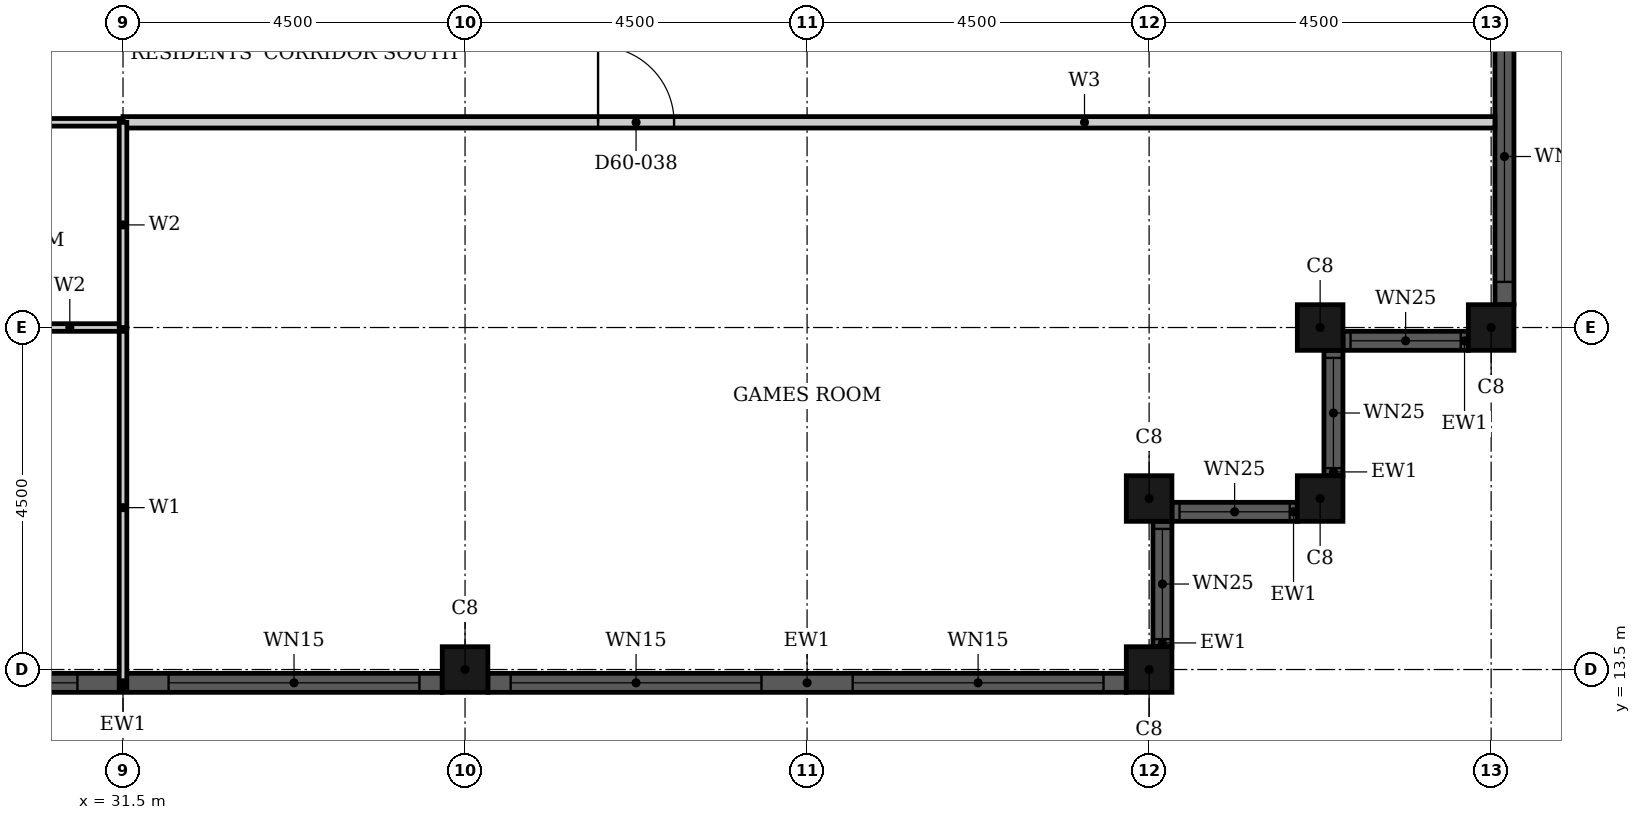
"""IFC4 building model, lengths in metres.
Left out: names, types, materials, properties, quantities, classifications, styles, units other than length and angle.
Written with IfcOpenShell. Run it as: python <this file> out.ifc"""

import sys

from ifc_helpers import new_model, si_unit, direction, frame, frame_2d, origin, origin_2d, place, context, subcontext, project, spatial, rectangle, hollow_rectangle, extrude, element, fill, save


model = new_model("IFC4")
c1 = context("Model", 3, precision=1e-05, world=origin(), true_north=direction((0.0, 1.0)))
c2 = subcontext(c1, "Body", "Model", "MODEL_VIEW")
j1 = project(units=[si_unit("LENGTHUNIT", "METRE"), si_unit("PLANEANGLEUNIT", "RADIAN")], contexts=[c1])
p1 = place(None, origin())
s1 = spatial("IfcSite", under=j1, at=p1, CompositionType="ELEMENT")
p2 = place(p1, origin())
s2 = spatial("IfcBuilding", under=s1, at=p2, CompositionType="ELEMENT")
p3 = place(p2, frame((0.0, 0.0, 237.9)))
s3 = spatial("IfcBuildingStorey", under=s2, at=p3, CompositionType="ELEMENT", Elevation=237.9)
for number, where, z_axis, x_axis in (
    (1, (36.0, 13.5, 0.0), (0.0, 0.0, 1.0), (1.0, 0.0, 0.0)),
    (2, (45.0, 13.5, 0.0), (0.0, 0.0, 1.0), (1.0, 0.0, 0.0)),
    (3, (45.0, 15.75, 0.0), (0.0, 0.0, 1.0), (1.0, 0.0, 0.0)),
    (4, (47.25, 15.75, 0.0), (0.0, 0.0, 1.0), (1.0, 0.0, 0.0)),
    (5, (47.25, 18.0, 0.0), (0.0, 0.0, 1.0), (1.0, 0.0, 0.0)),
    (6, (49.5, 18.0, 0.0), (0.0, 0.0, 1.0), (1.0, 0.0, 0.0)),
):
    element("IfcColumn", number, at=place(p3, frame(where, z_axis=z_axis, x_axis=x_axis)), inside=s3, PredefinedType="COLUMN", context=c2, shape_type="SweptSolid", body=[
        extrude(hollow_rectangle(XDim=0.6, YDim=0.6, WallThickness=0.02, at=origin_2d()), origin(), (0.0, 0.0, 1.0), 3.7),
    ])
p4 = place(p3, frame((27.3, 13.325, 0.0), z_axis=(0.0, 0.0, 1.0), x_axis=(1.0, 0.0, 0.0)))
e7 = element("IfcWall", 7, at=p4, inside=s3, PredefinedType="SOLIDWALL", context=c2, shape_type="SweptSolid", body=[
    extrude(rectangle(XDim=8.4, YDim=0.25, at=frame_2d((4.2, 0.0))), origin(), (0.0, 0.0, 1.0), 3.7),
])
p5 = place(p4, frame((0.3, 0.0, 0.45)))
e8 = element("IfcOpeningElement", 8, at=p5, cuts=e7, PredefinedType="OPENING", context=c2, shape_type="SweptSolid", body=[
    extrude(rectangle(XDim=3.3, YDim=2.3, at=frame_2d((1.65, 1.15))), frame((0.0, 0.135, 0.0), z_axis=(0.0, -1.0, 0.0), x_axis=(1.0, 0.0, 0.0)), (0.0, 0.0, 1.0), 0.27),
])
p6 = place(p4, frame((4.8, 0.0, 0.45)))
e9 = element("IfcOpeningElement", 9, at=p6, cuts=e7, PredefinedType="OPENING", context=c2, shape_type="SweptSolid", body=[
    extrude(rectangle(XDim=3.3, YDim=2.3, at=frame_2d((1.65, 1.15))), frame((0.0, 0.135, 0.0), z_axis=(0.0, -1.0, 0.0), x_axis=(1.0, 0.0, 0.0)), (0.0, 0.0, 1.0), 0.27),
])
p7 = place(p3, frame((36.3, 13.325, 0.0), z_axis=(0.0, 0.0, 1.0), x_axis=(1.0, 0.0, 0.0)))
e10 = element("IfcWall", 10, at=p7, inside=s3, PredefinedType="SOLIDWALL", context=c2, shape_type="SweptSolid", body=[
    extrude(rectangle(XDim=8.4, YDim=0.25, at=frame_2d((4.2, 0.0))), origin(), (0.0, 0.0, 1.0), 3.7),
])
p8 = place(p7, frame((0.3, 0.0, 0.45)))
e11 = element("IfcOpeningElement", 11, at=p8, cuts=e10, PredefinedType="OPENING", context=c2, shape_type="SweptSolid", body=[
    extrude(rectangle(XDim=3.3, YDim=2.3, at=frame_2d((1.65, 1.15))), frame((0.0, 0.135, 0.0), z_axis=(0.0, -1.0, 0.0), x_axis=(1.0, 0.0, 0.0)), (0.0, 0.0, 1.0), 0.27),
])
p9 = place(p7, frame((4.8, 0.0, 0.45)))
e12 = element("IfcOpeningElement", 12, at=p9, cuts=e10, PredefinedType="OPENING", context=c2, shape_type="SweptSolid", body=[
    extrude(rectangle(XDim=3.3, YDim=2.3, at=frame_2d((1.65, 1.15))), frame((0.0, 0.135, 0.0), z_axis=(0.0, -1.0, 0.0), x_axis=(1.0, 0.0, 0.0)), (0.0, 0.0, 1.0), 0.27),
])
p10 = place(p3, frame((45.175, 13.8, 0.0), z_axis=(0.0, 0.0, 1.0), x_axis=(0.0, 1.0, 0.0)))
e13 = element("IfcWall", 13, at=p10, inside=s3, PredefinedType="SOLIDWALL", context=c2, shape_type="SweptSolid", body=[
    extrude(rectangle(XDim=1.65, YDim=0.25, at=frame_2d((0.825, 0.0))), origin(), (0.0, 0.0, 1.0), 3.7),
])
p11 = place(p10, frame((0.1, 0.0, 0.9)))
e14 = element("IfcOpeningElement", 14, at=p11, cuts=e13, PredefinedType="OPENING", context=c2, shape_type="SweptSolid", body=[
    extrude(rectangle(XDim=1.45, YDim=1.85, at=frame_2d((0.725, 0.925))), frame((0.0, 0.135, 0.0), z_axis=(0.0, -1.0, 0.0), x_axis=(1.0, 0.0, 0.0)), (0.0, 0.0, 1.0), 0.27),
])
p12 = place(p3, frame((45.3, 15.575, 0.0), z_axis=(0.0, 0.0, 1.0), x_axis=(1.0, 0.0, 0.0)))
e15 = element("IfcWall", 15, at=p12, inside=s3, PredefinedType="SOLIDWALL", context=c2, shape_type="SweptSolid", body=[
    extrude(rectangle(XDim=1.65, YDim=0.25, at=frame_2d((0.825, 0.0))), origin(), (0.0, 0.0, 1.0), 3.7),
])
p13 = place(p12, frame((0.1, 0.0, 0.9)))
e16 = element("IfcOpeningElement", 16, at=p13, cuts=e15, PredefinedType="OPENING", context=c2, shape_type="SweptSolid", body=[
    extrude(rectangle(XDim=1.45, YDim=1.85, at=frame_2d((0.725, 0.925))), frame((0.0, 0.135, 0.0), z_axis=(0.0, -1.0, 0.0), x_axis=(1.0, 0.0, 0.0)), (0.0, 0.0, 1.0), 0.27),
])
p14 = place(p3, frame((47.425, 16.05, 0.0), z_axis=(0.0, 0.0, 1.0), x_axis=(0.0, 1.0, 0.0)))
e17 = element("IfcWall", 17, at=p14, inside=s3, PredefinedType="SOLIDWALL", context=c2, shape_type="SweptSolid", body=[
    extrude(rectangle(XDim=1.65, YDim=0.25, at=frame_2d((0.825, 0.0))), origin(), (0.0, 0.0, 1.0), 3.7),
])
p15 = place(p14, frame((0.1, 0.0, 0.9)))
e18 = element("IfcOpeningElement", 18, at=p15, cuts=e17, PredefinedType="OPENING", context=c2, shape_type="SweptSolid", body=[
    extrude(rectangle(XDim=1.45, YDim=1.85, at=frame_2d((0.725, 0.925))), frame((0.0, 0.135, 0.0), z_axis=(0.0, -1.0, 0.0), x_axis=(1.0, 0.0, 0.0)), (0.0, 0.0, 1.0), 0.27),
])
p16 = place(p3, frame((47.55, 17.825, 0.0), z_axis=(0.0, 0.0, 1.0), x_axis=(1.0, 0.0, 0.0)))
e19 = element("IfcWall", 19, at=p16, inside=s3, PredefinedType="SOLIDWALL", context=c2, shape_type="SweptSolid", body=[
    extrude(rectangle(XDim=1.65, YDim=0.25, at=frame_2d((0.825, 0.0))), origin(), (0.0, 0.0, 1.0), 3.7),
])
p17 = place(p16, frame((0.1, 0.0, 0.9)))
e20 = element("IfcOpeningElement", 20, at=p17, cuts=e19, PredefinedType="OPENING", context=c2, shape_type="SweptSolid", body=[
    extrude(rectangle(XDim=1.45, YDim=1.85, at=frame_2d((0.725, 0.925))), frame((0.0, 0.135, 0.0), z_axis=(0.0, -1.0, 0.0), x_axis=(1.0, 0.0, 0.0)), (0.0, 0.0, 1.0), 0.27),
])
p18 = place(p3, frame((49.675, 18.3, 0.0), z_axis=(0.0, 0.0, 1.0), x_axis=(0.0, 1.0, 0.0)))
e21 = element("IfcWall", 21, at=p18, inside=s3, PredefinedType="SOLIDWALL", context=c2, shape_type="SweptSolid", body=[
    extrude(rectangle(XDim=8.4, YDim=0.25, at=frame_2d((4.2, 0.0))), origin(), (0.0, 0.0, 1.0), 3.7),
])
p19 = place(p18, frame((0.3, 0.0, 0.45)))
e22 = element("IfcOpeningElement", 22, at=p19, cuts=e21, PredefinedType="OPENING", context=c2, shape_type="SweptSolid", body=[
    extrude(rectangle(XDim=3.3, YDim=2.3, at=frame_2d((1.65, 1.15))), frame((0.0, 0.135, 0.0), z_axis=(0.0, -1.0, 0.0), x_axis=(1.0, 0.0, 0.0)), (0.0, 0.0, 1.0), 0.27),
])
p20 = place(p18, frame((4.8, 0.0, 0.45)))
e23 = element("IfcOpeningElement", 23, at=p20, cuts=e21, PredefinedType="OPENING", context=c2, shape_type="SweptSolid", body=[
    extrude(rectangle(XDim=3.3, YDim=2.3, at=frame_2d((1.65, 1.15))), frame((0.0, 0.135, 0.0), z_axis=(0.0, -1.0, 0.0), x_axis=(1.0, 0.0, 0.0)), (0.0, 0.0, 1.0), 0.27),
])
p21 = place(p3, frame((31.5, 20.7, 0.0), z_axis=(0.0, 0.0, 1.0), x_axis=(1.0, 0.0, 0.0)))
e24 = element("IfcWall", 24, at=p21, inside=s3, PredefinedType="PARTITIONING", context=c2, shape_type="SweptSolid", body=[
    extrude(rectangle(XDim=18.05, YDim=0.15, at=frame_2d((9.025, 0.0))), origin(), (0.0, 0.0, 1.0), 3.4),
])
p22 = place(p21, frame((6.25, 0.0, 0.0)))
e25 = element("IfcOpeningElement", 25, at=p22, cuts=e24, PredefinedType="OPENING", context=c2, shape_type="SweptSolid", body=[
    extrude(rectangle(XDim=1.0, YDim=2.1, at=frame_2d((0.5, 1.05))), frame((0.0, 0.085, 0.0), z_axis=(0.0, -1.0, 0.0), x_axis=(1.0, 0.0, 0.0)), (0.0, 0.0, 1.0), 0.17),
])
p23 = place(p3, frame((31.5, 13.26, 0.0), z_axis=(0.0, 0.0, 1.0), x_axis=(0.0, 1.0, 0.0)))
e26 = element("IfcWall", 26, at=p23, inside=s3, PredefinedType="PARTITIONING", context=c2, shape_type="SweptSolid", body=[
    extrude(rectangle(XDim=4.74, YDim=0.1, at=frame_2d((2.37, 0.0))), origin(), (0.0, 0.0, 1.0), 3.4),
])
p24 = place(p3, frame((27.9, 18.0, 0.0), z_axis=(0.0, 0.0, 1.0), x_axis=(1.0, 0.0, 0.0)))
e27 = element("IfcWall", 27, at=p24, inside=s3, PredefinedType="PARTITIONING", context=c2, shape_type="SweptSolid", body=[
    extrude(rectangle(XDim=3.6, YDim=0.1, at=frame_2d((1.8, 0.0))), origin(), (0.0, 0.0, 1.0), 3.4),
])
p25 = place(p24, frame((1.4, 0.0, 0.0)))
e28 = element("IfcOpeningElement", 28, at=p25, cuts=e27, PredefinedType="OPENING", context=c2, shape_type="SweptSolid", body=[
    extrude(rectangle(XDim=0.8, YDim=2.1, at=frame_2d((0.4, 1.05))), frame((0.0, 0.06, 0.0), z_axis=(0.0, -1.0, 0.0), x_axis=(1.0, 0.0, 0.0)), (0.0, 0.0, 1.0), 0.12),
])
p26 = place(p3, frame((27.9, 20.7, 0.0), z_axis=(0.0, 0.0, 1.0), x_axis=(1.0, 0.0, 0.0)))
e29 = element("IfcWall", 29, at=p26, inside=s3, PredefinedType="PARTITIONING", context=c2, shape_type="SweptSolid", body=[
    extrude(rectangle(XDim=3.6, YDim=0.1, at=frame_2d((1.8, 0.0))), origin(), (0.0, 0.0, 1.0), 3.4),
])
p27 = place(p3, frame((31.5, 18.0, 0.0), z_axis=(0.0, 0.0, 1.0), x_axis=(0.0, 1.0, 0.0)))
e30 = element("IfcWall", 30, at=p27, inside=s3, PredefinedType="PARTITIONING", context=c2, shape_type="SweptSolid", body=[
    extrude(rectangle(XDim=2.7, YDim=0.1, at=frame_2d((1.35, 0.0))), origin(), (0.0, 0.0, 1.0), 3.4),
])
p28 = place(p5, origin())
e31 = element("IfcWindow", 31, at=p28, inside=s3, PartitioningType="SINGLE_PANEL", PredefinedType="WINDOW", context=c2, shape_type="SweptSolid", body=[
    extrude(rectangle(XDim=3.3, YDim=2.3, at=frame_2d((1.65, 1.15))), frame((0.0, 0.03, 0.0), z_axis=(0.0, -1.0, 0.0), x_axis=(1.0, 0.0, 0.0)), (0.0, 0.0, 1.0), 0.06),
])
fill(e8, e31)
p29 = place(p6, origin())
e32 = element("IfcWindow", 32, at=p29, inside=s3, PartitioningType="SINGLE_PANEL", PredefinedType="WINDOW", context=c2, shape_type="SweptSolid", body=[
    extrude(rectangle(XDim=3.3, YDim=2.3, at=frame_2d((1.65, 1.15))), frame((0.0, 0.03, 0.0), z_axis=(0.0, -1.0, 0.0), x_axis=(1.0, 0.0, 0.0)), (0.0, 0.0, 1.0), 0.06),
])
fill(e9, e32)
p30 = place(p8, origin())
e33 = element("IfcWindow", 33, at=p30, inside=s3, PartitioningType="SINGLE_PANEL", PredefinedType="WINDOW", context=c2, shape_type="SweptSolid", body=[
    extrude(rectangle(XDim=3.3, YDim=2.3, at=frame_2d((1.65, 1.15))), frame((0.0, 0.03, 0.0), z_axis=(0.0, -1.0, 0.0), x_axis=(1.0, 0.0, 0.0)), (0.0, 0.0, 1.0), 0.06),
])
fill(e11, e33)
p31 = place(p9, origin())
e34 = element("IfcWindow", 34, at=p31, inside=s3, PartitioningType="SINGLE_PANEL", PredefinedType="WINDOW", context=c2, shape_type="SweptSolid", body=[
    extrude(rectangle(XDim=3.3, YDim=2.3, at=frame_2d((1.65, 1.15))), frame((0.0, 0.03, 0.0), z_axis=(0.0, -1.0, 0.0), x_axis=(1.0, 0.0, 0.0)), (0.0, 0.0, 1.0), 0.06),
])
fill(e12, e34)
p32 = place(p11, origin())
e35 = element("IfcWindow", 35, at=p32, inside=s3, PartitioningType="SINGLE_PANEL", PredefinedType="WINDOW", context=c2, shape_type="SweptSolid", body=[
    extrude(rectangle(XDim=1.45, YDim=1.85, at=frame_2d((0.725, 0.925))), frame((0.0, 0.03, 0.0), z_axis=(0.0, -1.0, 0.0), x_axis=(1.0, 0.0, 0.0)), (0.0, 0.0, 1.0), 0.06),
])
fill(e14, e35)
p33 = place(p13, origin())
e36 = element("IfcWindow", 36, at=p33, inside=s3, PartitioningType="SINGLE_PANEL", PredefinedType="WINDOW", context=c2, shape_type="SweptSolid", body=[
    extrude(rectangle(XDim=1.45, YDim=1.85, at=frame_2d((0.725, 0.925))), frame((0.0, 0.03, 0.0), z_axis=(0.0, -1.0, 0.0), x_axis=(1.0, 0.0, 0.0)), (0.0, 0.0, 1.0), 0.06),
])
fill(e16, e36)
p34 = place(p15, origin())
e37 = element("IfcWindow", 37, at=p34, inside=s3, PartitioningType="SINGLE_PANEL", PredefinedType="WINDOW", context=c2, shape_type="SweptSolid", body=[
    extrude(rectangle(XDim=1.45, YDim=1.85, at=frame_2d((0.725, 0.925))), frame((0.0, 0.03, 0.0), z_axis=(0.0, -1.0, 0.0), x_axis=(1.0, 0.0, 0.0)), (0.0, 0.0, 1.0), 0.06),
])
fill(e18, e37)
p35 = place(p17, origin())
e38 = element("IfcWindow", 38, at=p35, inside=s3, PartitioningType="SINGLE_PANEL", PredefinedType="WINDOW", context=c2, shape_type="SweptSolid", body=[
    extrude(rectangle(XDim=1.45, YDim=1.85, at=frame_2d((0.725, 0.925))), frame((0.0, 0.03, 0.0), z_axis=(0.0, -1.0, 0.0), x_axis=(1.0, 0.0, 0.0)), (0.0, 0.0, 1.0), 0.06),
])
fill(e20, e38)
p36 = place(p19, origin())
e39 = element("IfcWindow", 39, at=p36, inside=s3, PartitioningType="SINGLE_PANEL", PredefinedType="WINDOW", context=c2, shape_type="SweptSolid", body=[
    extrude(rectangle(XDim=3.3, YDim=2.3, at=frame_2d((1.65, 1.15))), frame((0.0, 0.03, 0.0), z_axis=(0.0, -1.0, 0.0), x_axis=(1.0, 0.0, 0.0)), (0.0, 0.0, 1.0), 0.06),
])
fill(e22, e39)
p37 = place(p22, origin())
e40 = element("IfcDoor", 40, at=p37, inside=s3, OperationType="SINGLE_SWING_LEFT", PredefinedType="DOOR", context=c2, shape_type="SweptSolid", body=[
    extrude(rectangle(XDim=1.0, YDim=2.1, at=frame_2d((0.5, 1.05))), frame((0.0, 0.025, 0.0), z_axis=(0.0, -1.0, 0.0), x_axis=(1.0, 0.0, 0.0)), (0.0, 0.0, 1.0), 0.05),
])
fill(e25, e40)
save(model, sys.argv[1])
